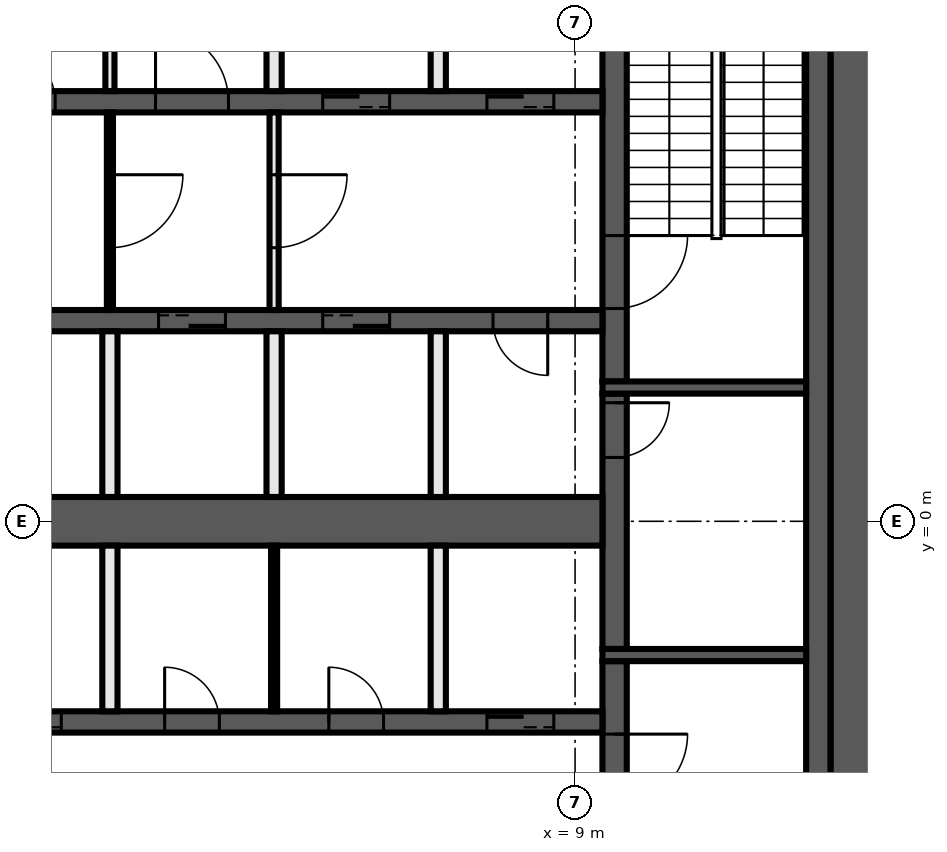
"""IFC4 building model, lengths in metres.
Left out: names, types, materials, properties, quantities, classifications, styles, units other than length and angle.
Written with IfcOpenShell. Run it as: python <this file> out.ifc"""

import sys

from ifc_helpers import new_model, si_unit, direction, frame, frame_2d, origin, place, context, subcontext, project, spatial, rectangle, extrude, element, fill, save


model = new_model("IFC4")
c1 = context("Model", 3, precision=1e-05, world=origin(), true_north=direction((0.0, 1.0)))
c2 = subcontext(c1, "Body", "Model", "MODEL_VIEW")
j1 = project(units=[si_unit("LENGTHUNIT", "METRE"), si_unit("PLANEANGLEUNIT", "RADIAN")], contexts=[c1])
p1 = place(None, origin())
s1 = spatial("IfcSite", under=j1, at=p1, CompositionType="ELEMENT")
p2 = place(p1, origin())
s2 = spatial("IfcBuilding", under=s1, at=p2, CompositionType="ELEMENT")
p3 = place(p2, frame((0.0, 0.0, 207.2)))
s3 = spatial("IfcBuildingStorey", under=s2, at=p3, CompositionType="ELEMENT", Elevation=207.2)
p4 = place(p3, frame((13.6, 10.2, 0.0), z_axis=(0.0, 0.0, 1.0), x_axis=(0.0, -1.0, 0.0)))
e1 = element("IfcWall", 1, at=p4, inside=s3, PredefinedType="SHEAR", context=c2, shape_type="SweptSolid", body=[
    extrude(rectangle(XDim=20.4, YDim=0.8, at=frame_2d((10.2, 0.0))), origin(), (0.0, 0.0, 1.0), 3.82),
])
p5 = place(p3, frame((13.0, 9.8, 0.0), z_axis=(0.0, 0.0, 1.0), x_axis=(0.0, -1.0, 0.0)))
e2 = element("IfcWall", 2, at=p5, inside=s3, PredefinedType="SHEAR", context=c2, shape_type="SweptSolid", body=[
    extrude(rectangle(XDim=19.6, YDim=0.4, at=frame_2d((9.8, 0.0))), origin(), (0.0, 0.0, 1.0), 3.82),
])
p6 = place(p3, frame((9.65, -2.3, 0.0), z_axis=(0.0, 0.0, 1.0), x_axis=(0.0, -1.0, 0.0)))
e3 = element("IfcWall", 3, at=p6, inside=s3, PredefinedType="SHEAR", context=c2, shape_type="SweptSolid", body=[
    extrude(rectangle(XDim=7.5, YDim=0.4, at=frame_2d((3.75, 0.0))), origin(), (0.0, 0.0, 1.0), 3.82),
])
p7 = place(p6, frame((1.2, 0.0, 0.0)))
e4 = element("IfcOpeningElement", 4, at=p7, cuts=e3, PredefinedType="OPENING", context=c2, shape_type="SweptSolid", body=[
    extrude(rectangle(XDim=1.2, YDim=2.1, at=frame_2d((0.6, 1.05))), frame((0.0, 0.21, 0.0), z_axis=(0.0, -1.0, 0.0), x_axis=(1.0, 0.0, 0.0)), (0.0, 0.0, 1.0), 0.42),
])
p8 = place(p3, frame((9.65, 2.1, 0.0), z_axis=(0.0, 0.0, 1.0), x_axis=(0.0, -1.0, 0.0)))
e5 = element("IfcWall", 5, at=p8, inside=s3, PredefinedType="SHEAR", context=c2, shape_type="SweptSolid", body=[
    extrude(rectangle(XDim=4.2, YDim=0.4, at=frame_2d((2.1, 0.0))), origin(), (0.0, 0.0, 1.0), 3.82),
])
p9 = place(p8, frame((0.15, 0.0, 0.0)))
e6 = element("IfcOpeningElement", 6, at=p9, cuts=e5, PredefinedType="OPENING", context=c2, shape_type="SweptSolid", body=[
    extrude(rectangle(XDim=0.9, YDim=2.1, at=frame_2d((0.45, 1.05))), frame((0.0, 0.21, 0.0), z_axis=(0.0, -1.0, 0.0), x_axis=(1.0, 0.0, 0.0)), (0.0, 0.0, 1.0), 0.42),
])
p10 = place(p3, frame((9.65, 9.8, 0.0), z_axis=(0.0, 0.0, 1.0), x_axis=(0.0, -1.0, 0.0)))
e7 = element("IfcWall", 7, at=p10, inside=s3, PredefinedType="SHEAR", context=c2, shape_type="SweptSolid", body=[
    extrude(rectangle(XDim=7.5, YDim=0.4, at=frame_2d((3.75, 0.0))), origin(), (0.0, 0.0, 1.0), 3.82),
])
p11 = place(p10, frame((5.1, 0.0, 0.0)))
e8 = element("IfcOpeningElement", 8, at=p11, cuts=e7, PredefinedType="OPENING", context=c2, shape_type="SweptSolid", body=[
    extrude(rectangle(XDim=1.2, YDim=2.1, at=frame_2d((0.6, 1.05))), frame((0.0, 0.21, 0.0), z_axis=(0.0, -1.0, 0.0), x_axis=(1.0, 0.0, 0.0)), (0.0, 0.0, 1.0), 0.42),
])
for number, where, z_axis, x_axis in (
    (9, (9.45, 2.2, 0.0), (0.0, 0.0, 1.0), (1.0, 0.0, 0.0)),
    (10, (9.45, -2.2, 0.0), (0.0, 0.0, 1.0), (1.0, 0.0, 0.0)),
):
    element("IfcWall", number, at=place(p3, frame(where, z_axis=z_axis, x_axis=x_axis)), inside=s3, PredefinedType="SHEAR", context=c2, shape_type="SweptSolid", body=[
        extrude(rectangle(XDim=3.35, YDim=0.2, at=frame_2d((1.675, 0.0))), origin(), (0.0, 0.0, 1.0), 3.82),
    ])
p12 = place(p3, frame((-9.45, 6.9, 0.0), z_axis=(0.0, 0.0, 1.0), x_axis=(1.0, 0.0, 0.0)))
e11 = element("IfcWall", 11, at=p12, inside=s3, PredefinedType="SHEAR", context=c2, shape_type="SweptSolid", body=[
    extrude(rectangle(XDim=18.9, YDim=0.35, at=frame_2d((9.45, 0.0))), origin(), (0.0, 0.0, 1.0), 3.82),
])
p13 = place(p12, frame((11.55, 0.0, 0.0)))
e12 = element("IfcOpeningElement", 12, at=p13, cuts=e11, PredefinedType="OPENING", context=c2, shape_type="SweptSolid", body=[
    extrude(rectangle(XDim=1.2, YDim=2.1, at=frame_2d((0.6, 1.05))), frame((0.0, 0.185, 0.0), z_axis=(0.0, -1.0, 0.0), x_axis=(1.0, 0.0, 0.0)), (0.0, 0.0, 1.0), 0.37),
])
p14 = place(p12, frame((14.3, 0.0, 0.0)))
e13 = element("IfcOpeningElement", 13, at=p14, cuts=e11, PredefinedType="OPENING", context=c2, shape_type="SweptSolid", body=[
    extrude(rectangle(XDim=1.1, YDim=2.1, at=frame_2d((0.55, 1.05))), frame((0.0, 0.185, 0.0), z_axis=(0.0, -1.0, 0.0), x_axis=(1.0, 0.0, 0.0)), (0.0, 0.0, 1.0), 0.37),
])
p15 = place(p12, frame((17.0, 0.0, 0.0)))
e14 = element("IfcOpeningElement", 14, at=p15, cuts=e11, PredefinedType="OPENING", context=c2, shape_type="SweptSolid", body=[
    extrude(rectangle(XDim=1.1, YDim=2.1, at=frame_2d((0.55, 1.05))), frame((0.0, 0.185, 0.0), z_axis=(0.0, -1.0, 0.0), x_axis=(1.0, 0.0, 0.0)), (0.0, 0.0, 1.0), 0.37),
])
p16 = place(p12, frame((0.9, 0.0, 0.0)))
e15 = element("IfcOpeningElement", 15, at=p16, cuts=e11, PredefinedType="OPENING", context=c2, shape_type="SweptSolid", body=[
    extrude(rectangle(XDim=0.9, YDim=2.1, at=frame_2d((0.45, 1.05))), frame((0.0, 0.185, 0.0), z_axis=(0.0, -1.0, 0.0), x_axis=(1.0, 0.0, 0.0)), (0.0, 0.0, 1.0), 0.37),
])
p17 = place(p12, frame((4.95, 0.0, 0.0)))
e16 = element("IfcOpeningElement", 16, at=p17, cuts=e11, PredefinedType="OPENING", context=c2, shape_type="SweptSolid", body=[
    extrude(rectangle(XDim=0.9, YDim=2.1, at=frame_2d((0.45, 1.05))), frame((0.0, 0.185, 0.0), z_axis=(0.0, -1.0, 0.0), x_axis=(1.0, 0.0, 0.0)), (0.0, 0.0, 1.0), 0.37),
])
p18 = place(p12, frame((9.0, 0.0, 0.0)))
e17 = element("IfcOpeningElement", 17, at=p18, cuts=e11, PredefinedType="OPENING", context=c2, shape_type="SweptSolid", body=[
    extrude(rectangle(XDim=0.9, YDim=2.1, at=frame_2d((0.45, 1.05))), frame((0.0, 0.185, 0.0), z_axis=(0.0, -1.0, 0.0), x_axis=(1.0, 0.0, 0.0)), (0.0, 0.0, 1.0), 0.37),
])
p19 = place(p3, frame((9.45, 3.3, 0.0), z_axis=(0.0, 0.0, 1.0), x_axis=(-1.0, 0.0, 0.0)))
e18 = element("IfcWall", 18, at=p19, inside=s3, PredefinedType="SHEAR", context=c2, shape_type="SweptSolid", body=[
    extrude(rectangle(XDim=18.9, YDim=0.35, at=frame_2d((9.45, 0.0))), origin(), (0.0, 0.0, 1.0), 3.82),
])
p20 = place(p19, frame((6.2, 0.0, 0.0)))
e19 = element("IfcOpeningElement", 19, at=p20, cuts=e18, PredefinedType="OPENING", context=c2, shape_type="SweptSolid", body=[
    extrude(rectangle(XDim=1.1, YDim=2.1, at=frame_2d((0.55, 1.05))), frame((0.0, 0.185, 0.0), z_axis=(0.0, -1.0, 0.0), x_axis=(1.0, 0.0, 0.0)), (0.0, 0.0, 1.0), 0.37),
])
p21 = place(p19, frame((3.5, 0.0, 0.0)))
e20 = element("IfcOpeningElement", 20, at=p21, cuts=e18, PredefinedType="OPENING", context=c2, shape_type="SweptSolid", body=[
    extrude(rectangle(XDim=1.1, YDim=2.1, at=frame_2d((0.55, 1.05))), frame((0.0, 0.185, 0.0), z_axis=(0.0, -1.0, 0.0), x_axis=(1.0, 0.0, 0.0)), (0.0, 0.0, 1.0), 0.37),
])
p22 = place(p19, frame((0.9, 0.0, 0.0)))
e21 = element("IfcOpeningElement", 21, at=p22, cuts=e18, PredefinedType="OPENING", context=c2, shape_type="SweptSolid", body=[
    extrude(rectangle(XDim=0.9, YDim=2.1, at=frame_2d((0.45, 1.05))), frame((0.0, 0.185, 0.0), z_axis=(0.0, -1.0, 0.0), x_axis=(1.0, 0.0, 0.0)), (0.0, 0.0, 1.0), 0.37),
])
p23 = place(p19, frame((15.75, 0.0, 0.0)))
e22 = element("IfcOpeningElement", 22, at=p23, cuts=e18, PredefinedType="OPENING", context=c2, shape_type="SweptSolid", body=[
    extrude(rectangle(XDim=0.9, YDim=2.1, at=frame_2d((0.45, 1.05))), frame((0.0, 0.185, 0.0), z_axis=(0.0, -1.0, 0.0), x_axis=(1.0, 0.0, 0.0)), (0.0, 0.0, 1.0), 0.37),
])
p24 = place(p19, frame((10.35, 0.0, 0.0)))
e23 = element("IfcOpeningElement", 23, at=p24, cuts=e18, PredefinedType="OPENING", context=c2, shape_type="SweptSolid", body=[
    extrude(rectangle(XDim=0.9, YDim=2.1, at=frame_2d((0.45, 1.05))), frame((0.0, 0.185, 0.0), z_axis=(0.0, -1.0, 0.0), x_axis=(1.0, 0.0, 0.0)), (0.0, 0.0, 1.0), 0.37),
])
p25 = place(p3, frame((-9.45, -3.3, 0.0), z_axis=(0.0, 0.0, 1.0), x_axis=(1.0, 0.0, 0.0)))
e24 = element("IfcWall", 24, at=p25, inside=s3, PredefinedType="SHEAR", context=c2, shape_type="SweptSolid", body=[
    extrude(rectangle(XDim=18.9, YDim=0.35, at=frame_2d((9.45, 0.0))), origin(), (0.0, 0.0, 1.0), 3.82),
])
p26 = place(p25, frame((0.8, 0.0, 0.0)))
e25 = element("IfcOpeningElement", 25, at=p26, cuts=e24, PredefinedType="OPENING", context=c2, shape_type="SweptSolid", body=[
    extrude(rectangle(XDim=1.1, YDim=2.1, at=frame_2d((0.55, 1.05))), frame((0.0, 0.185, 0.0), z_axis=(0.0, -1.0, 0.0), x_axis=(1.0, 0.0, 0.0)), (0.0, 0.0, 1.0), 0.37),
])
p27 = place(p25, frame((3.5, 0.0, 0.0)))
e26 = element("IfcOpeningElement", 26, at=p27, cuts=e24, PredefinedType="OPENING", context=c2, shape_type="SweptSolid", body=[
    extrude(rectangle(XDim=1.1, YDim=2.1, at=frame_2d((0.55, 1.05))), frame((0.0, 0.185, 0.0), z_axis=(0.0, -1.0, 0.0), x_axis=(1.0, 0.0, 0.0)), (0.0, 0.0, 1.0), 0.37),
])
p28 = place(p25, frame((6.2, 0.0, 0.0)))
e27 = element("IfcOpeningElement", 27, at=p28, cuts=e24, PredefinedType="OPENING", context=c2, shape_type="SweptSolid", body=[
    extrude(rectangle(XDim=1.1, YDim=2.1, at=frame_2d((0.55, 1.05))), frame((0.0, 0.185, 0.0), z_axis=(0.0, -1.0, 0.0), x_axis=(1.0, 0.0, 0.0)), (0.0, 0.0, 1.0), 0.37),
])
p29 = place(p25, frame((8.9, 0.0, 0.0)))
e28 = element("IfcOpeningElement", 28, at=p29, cuts=e24, PredefinedType="OPENING", context=c2, shape_type="SweptSolid", body=[
    extrude(rectangle(XDim=1.1, YDim=2.1, at=frame_2d((0.55, 1.05))), frame((0.0, 0.185, 0.0), z_axis=(0.0, -1.0, 0.0), x_axis=(1.0, 0.0, 0.0)), (0.0, 0.0, 1.0), 0.37),
])
p30 = place(p25, frame((17.0, 0.0, 0.0)))
e29 = element("IfcOpeningElement", 29, at=p30, cuts=e24, PredefinedType="OPENING", context=c2, shape_type="SweptSolid", body=[
    extrude(rectangle(XDim=1.1, YDim=2.1, at=frame_2d((0.55, 1.05))), frame((0.0, 0.185, 0.0), z_axis=(0.0, -1.0, 0.0), x_axis=(1.0, 0.0, 0.0)), (0.0, 0.0, 1.0), 0.37),
])
p31 = place(p25, frame((11.7, 0.0, 0.0)))
e30 = element("IfcOpeningElement", 30, at=p31, cuts=e24, PredefinedType="OPENING", context=c2, shape_type="SweptSolid", body=[
    extrude(rectangle(XDim=0.9, YDim=2.1, at=frame_2d((0.45, 1.05))), frame((0.0, 0.185, 0.0), z_axis=(0.0, -1.0, 0.0), x_axis=(1.0, 0.0, 0.0)), (0.0, 0.0, 1.0), 0.37),
])
p32 = place(p25, frame((14.4, 0.0, 0.0)))
e31 = element("IfcOpeningElement", 31, at=p32, cuts=e24, PredefinedType="OPENING", context=c2, shape_type="SweptSolid", body=[
    extrude(rectangle(XDim=0.9, YDim=2.1, at=frame_2d((0.45, 1.05))), frame((0.0, 0.185, 0.0), z_axis=(0.0, -1.0, 0.0), x_axis=(1.0, 0.0, 0.0)), (0.0, 0.0, 1.0), 0.37),
])
p33 = place(p3, frame((-9.45, 0.0, 0.0), z_axis=(0.0, 0.0, 1.0), x_axis=(1.0, 0.0, 0.0)))
e32 = element("IfcWall", 32, at=p33, inside=s3, PredefinedType="SHEAR", context=c2, shape_type="SweptSolid", body=[
    extrude(rectangle(XDim=18.9, YDim=0.8, at=frame_2d((9.45, 0.0))), origin(), (0.0, 0.0, 1.0), 3.82),
])
for number, where, z_axis, x_axis in (
    (33, (6.75, -3.125, 0.0), (0.0, 0.0, 1.0), (0.0, 1.0, 0.0)),
    (34, (6.75, 0.4, 0.0), (0.0, 0.0, 1.0), (0.0, 1.0, 0.0)),
    (35, (6.75, 7.075, 0.0), (0.0, 0.0, 1.0), (0.0, 1.0, 0.0)),
):
    element("IfcWall", number, at=place(p3, frame(where, z_axis=z_axis, x_axis=x_axis)), inside=s3, PredefinedType="SOLIDWALL", context=c2, shape_type="SweptSolid", body=[
        extrude(rectangle(XDim=2.725, YDim=0.25, at=frame_2d((1.363, 0.0))), origin(), (0.0, 0.0, 1.0), 3.82),
    ])
p34 = place(p3, frame((4.05, 6.725, 0.0), z_axis=(0.0, 0.0, 1.0), x_axis=(0.0, -1.0, 0.0)))
e36 = element("IfcWall", 36, at=p34, inside=s3, PredefinedType="PARTITIONING", context=c2, shape_type="SweptSolid", body=[
    extrude(rectangle(XDim=3.25, YDim=0.15, at=frame_2d((1.625, 0.0))), origin(), (0.0, 0.0, 1.0), 3.82),
])
p35 = place(p34, frame((1.025, 0.0, 0.0)))
e37 = element("IfcOpeningElement", 37, at=p35, cuts=e36, PredefinedType="OPENING", context=c2, shape_type="SweptSolid", body=[
    extrude(rectangle(XDim=1.2, YDim=2.1, at=frame_2d((0.6, 1.05))), frame((0.0, 0.085, 0.0), z_axis=(0.0, -1.0, 0.0), x_axis=(1.0, 0.0, 0.0)), (0.0, 0.0, 1.0), 0.17),
])
p36 = place(p3, frame((4.05, -3.125, 0.0), z_axis=(0.0, 0.0, 1.0), x_axis=(0.0, 1.0, 0.0)))
e38 = element("IfcWall", 38, at=p36, inside=s3, PredefinedType="PARTITIONING", context=c2, shape_type="SweptSolid", body=[
    extrude(rectangle(XDim=2.725, YDim=0.1, at=frame_2d((1.363, 0.0))), origin(), (0.0, 0.0, 1.0), 3.82),
])
for number, where, z_axis, x_axis in (
    (39, (4.05, 0.4, 0.0), (0.0, 0.0, 1.0), (0.0, 1.0, 0.0)),
    (40, (4.05, 7.075, 0.0), (0.0, 0.0, 1.0), (0.0, 1.0, 0.0)),
):
    element("IfcWall", number, at=place(p3, frame(where, z_axis=z_axis, x_axis=x_axis)), inside=s3, PredefinedType="SOLIDWALL", context=c2, shape_type="SweptSolid", body=[
        extrude(rectangle(XDim=2.725, YDim=0.25, at=frame_2d((1.363, 0.0))), origin(), (0.0, 0.0, 1.0), 3.82),
    ])
p37 = place(p3, frame((1.35, 7.075, 0.0), z_axis=(0.0, 0.0, 1.0), x_axis=(0.0, 1.0, 0.0)))
e41 = element("IfcWall", 41, at=p37, inside=s3, PredefinedType="PARTITIONING", context=c2, shape_type="SweptSolid", body=[
    extrude(rectangle(XDim=2.725, YDim=0.15, at=frame_2d((1.363, 0.0))), origin(), (0.0, 0.0, 1.0), 3.82),
])
p38 = place(p3, frame((1.35, 6.725, 0.0), z_axis=(0.0, 0.0, 1.0), x_axis=(0.0, -1.0, 0.0)))
e42 = element("IfcWall", 42, at=p38, inside=s3, PredefinedType="PARTITIONING", context=c2, shape_type="SweptSolid", body=[
    extrude(rectangle(XDim=3.25, YDim=0.1, at=frame_2d((1.625, 0.0))), origin(), (0.0, 0.0, 1.0), 3.82),
])
p39 = place(p38, frame((1.025, 0.0, 0.0)))
e43 = element("IfcOpeningElement", 43, at=p39, cuts=e42, PredefinedType="OPENING", context=c2, shape_type="SweptSolid", body=[
    extrude(rectangle(XDim=1.2, YDim=2.1, at=frame_2d((0.6, 1.05))), frame((0.0, 0.06, 0.0), z_axis=(0.0, -1.0, 0.0), x_axis=(1.0, 0.0, 0.0)), (0.0, 0.0, 1.0), 0.12),
])
for number, where, z_axis, x_axis in (
    (44, (1.35, -3.125, 0.0), (0.0, 0.0, 1.0), (0.0, 1.0, 0.0)),
    (45, (1.35, 0.4, 0.0), (0.0, 0.0, 1.0), (0.0, 1.0, 0.0)),
):
    element("IfcWall", number, at=place(p3, frame(where, z_axis=z_axis, x_axis=x_axis)), inside=s3, PredefinedType="SOLIDWALL", context=c2, shape_type="SweptSolid", body=[
        extrude(rectangle(XDim=2.725, YDim=0.25, at=frame_2d((1.363, 0.0))), origin(), (0.0, 0.0, 1.0), 3.82),
    ])
p40 = place(p9, origin())
e46 = element("IfcDoor", 46, at=p40, inside=s3, OperationType="SINGLE_SWING_RIGHT", PredefinedType="DOOR", context=c2, shape_type="SweptSolid", body=[
    extrude(rectangle(XDim=0.9, YDim=2.1, at=frame_2d((0.45, 1.05))), frame((0.0, 0.025, 0.0), z_axis=(0.0, -1.0, 0.0), x_axis=(1.0, 0.0, 0.0)), (0.0, 0.0, 1.0), 0.05),
])
fill(e6, e46)
p41 = place(p13, origin())
e47 = element("IfcDoor", 47, at=p41, inside=s3, OperationType="SINGLE_SWING_LEFT", PredefinedType="DOOR", context=c2, shape_type="SweptSolid", body=[
    extrude(rectangle(XDim=1.2, YDim=2.1, at=frame_2d((0.6, 1.05))), frame((0.0, 0.025, 0.0), z_axis=(0.0, -1.0, 0.0), x_axis=(1.0, 0.0, 0.0)), (0.0, 0.0, 1.0), 0.05),
])
fill(e12, e47)
p42 = place(p14, origin())
e48 = element("IfcDoor", 48, at=p42, inside=s3, OperationType="DOUBLE_DOOR_SLIDING", PredefinedType="DOOR", context=c2, shape_type="SweptSolid", body=[
    extrude(rectangle(XDim=1.1, YDim=2.1, at=frame_2d((0.55, 1.05))), frame((0.0, 0.025, 0.0), z_axis=(0.0, -1.0, 0.0), x_axis=(1.0, 0.0, 0.0)), (0.0, 0.0, 1.0), 0.05),
])
fill(e13, e48)
p43 = place(p15, origin())
e49 = element("IfcDoor", 49, at=p43, inside=s3, OperationType="DOUBLE_DOOR_SLIDING", PredefinedType="DOOR", context=c2, shape_type="SweptSolid", body=[
    extrude(rectangle(XDim=1.1, YDim=2.1, at=frame_2d((0.55, 1.05))), frame((0.0, 0.025, 0.0), z_axis=(0.0, -1.0, 0.0), x_axis=(1.0, 0.0, 0.0)), (0.0, 0.0, 1.0), 0.05),
])
fill(e14, e49)
p44 = place(p20, origin())
e50 = element("IfcDoor", 50, at=p44, inside=s3, OperationType="DOUBLE_DOOR_SLIDING", PredefinedType="DOOR", context=c2, shape_type="SweptSolid", body=[
    extrude(rectangle(XDim=1.1, YDim=2.1, at=frame_2d((0.55, 1.05))), frame((0.0, 0.025, 0.0), z_axis=(0.0, -1.0, 0.0), x_axis=(1.0, 0.0, 0.0)), (0.0, 0.0, 1.0), 0.05),
])
fill(e19, e50)
p45 = place(p21, origin())
e51 = element("IfcDoor", 51, at=p45, inside=s3, OperationType="DOUBLE_DOOR_SLIDING", PredefinedType="DOOR", context=c2, shape_type="SweptSolid", body=[
    extrude(rectangle(XDim=1.1, YDim=2.1, at=frame_2d((0.55, 1.05))), frame((0.0, 0.025, 0.0), z_axis=(0.0, -1.0, 0.0), x_axis=(1.0, 0.0, 0.0)), (0.0, 0.0, 1.0), 0.05),
])
fill(e20, e51)
p46 = place(p22, origin())
e52 = element("IfcDoor", 52, at=p46, inside=s3, OperationType="SINGLE_SWING_LEFT", PredefinedType="DOOR", context=c2, shape_type="SweptSolid", body=[
    extrude(rectangle(XDim=0.9, YDim=2.1, at=frame_2d((0.45, 1.05))), frame((0.0, 0.025, 0.0), z_axis=(0.0, -1.0, 0.0), x_axis=(1.0, 0.0, 0.0)), (0.0, 0.0, 1.0), 0.05),
])
fill(e21, e52)
p47 = place(p29, origin())
e53 = element("IfcDoor", 53, at=p47, inside=s3, OperationType="DOUBLE_DOOR_SLIDING", PredefinedType="DOOR", context=c2, shape_type="SweptSolid", body=[
    extrude(rectangle(XDim=1.1, YDim=2.1, at=frame_2d((0.55, 1.05))), frame((0.0, 0.025, 0.0), z_axis=(0.0, -1.0, 0.0), x_axis=(1.0, 0.0, 0.0)), (0.0, 0.0, 1.0), 0.05),
])
fill(e28, e53)
p48 = place(p30, origin())
e54 = element("IfcDoor", 54, at=p48, inside=s3, OperationType="DOUBLE_DOOR_SLIDING", PredefinedType="DOOR", context=c2, shape_type="SweptSolid", body=[
    extrude(rectangle(XDim=1.1, YDim=2.1, at=frame_2d((0.55, 1.05))), frame((0.0, 0.025, 0.0), z_axis=(0.0, -1.0, 0.0), x_axis=(1.0, 0.0, 0.0)), (0.0, 0.0, 1.0), 0.05),
])
fill(e29, e54)
p49 = place(p18, origin())
e55 = element("IfcDoor", 55, at=p49, inside=s3, OperationType="SINGLE_SWING_RIGHT", PredefinedType="DOOR", context=c2, shape_type="SweptSolid", body=[
    extrude(rectangle(XDim=0.9, YDim=2.1, at=frame_2d((0.45, 1.05))), frame((0.0, 0.025, 0.0), z_axis=(0.0, -1.0, 0.0), x_axis=(1.0, 0.0, 0.0)), (0.0, 0.0, 1.0), 0.05),
])
fill(e17, e55)
p50 = place(p31, origin())
e56 = element("IfcDoor", 56, at=p50, inside=s3, OperationType="SINGLE_SWING_LEFT", PredefinedType="DOOR", context=c2, shape_type="SweptSolid", body=[
    extrude(rectangle(XDim=0.9, YDim=2.1, at=frame_2d((0.45, 1.05))), frame((0.0, 0.025, 0.0), z_axis=(0.0, -1.0, 0.0), x_axis=(1.0, 0.0, 0.0)), (0.0, 0.0, 1.0), 0.05),
])
fill(e30, e56)
p51 = place(p32, origin())
e57 = element("IfcDoor", 57, at=p51, inside=s3, OperationType="SINGLE_SWING_RIGHT", PredefinedType="DOOR", context=c2, shape_type="SweptSolid", body=[
    extrude(rectangle(XDim=0.9, YDim=2.1, at=frame_2d((0.45, 1.05))), frame((0.0, 0.025, 0.0), z_axis=(0.0, -1.0, 0.0), x_axis=(1.0, 0.0, 0.0)), (0.0, 0.0, 1.0), 0.05),
])
fill(e31, e57)
p52 = place(p11, origin())
e58 = element("IfcDoor", 58, at=p52, inside=s3, OperationType="SINGLE_SWING_LEFT", PredefinedType="DOOR", context=c2, shape_type="SweptSolid", body=[
    extrude(rectangle(XDim=1.2, YDim=2.1, at=frame_2d((0.6, 1.05))), frame((0.0, 0.025, 0.0), z_axis=(0.0, -1.0, 0.0), x_axis=(1.0, 0.0, 0.0)), (0.0, 0.0, 1.0), 0.05),
])
fill(e8, e58)
p53 = place(p7, origin())
e59 = element("IfcDoor", 59, at=p53, inside=s3, OperationType="SINGLE_SWING_RIGHT", PredefinedType="DOOR", context=c2, shape_type="SweptSolid", body=[
    extrude(rectangle(XDim=1.2, YDim=2.1, at=frame_2d((0.6, 1.05))), frame((0.0, 0.025, 0.0), z_axis=(0.0, -1.0, 0.0), x_axis=(1.0, 0.0, 0.0)), (0.0, 0.0, 1.0), 0.05),
])
fill(e4, e59)
p54 = place(p39, origin())
e60 = element("IfcDoor", 60, at=p54, inside=s3, OperationType="SINGLE_SWING_LEFT", PredefinedType="DOOR", context=c2, shape_type="SweptSolid", body=[
    extrude(rectangle(XDim=1.2, YDim=2.1, at=frame_2d((0.6, 1.05))), frame((0.0, 0.025, 0.0), z_axis=(0.0, -1.0, 0.0), x_axis=(1.0, 0.0, 0.0)), (0.0, 0.0, 1.0), 0.05),
])
fill(e43, e60)
p55 = place(p35, origin())
e61 = element("IfcDoor", 61, at=p55, inside=s3, OperationType="SINGLE_SWING_RIGHT", PredefinedType="DOOR", context=c2, shape_type="SweptSolid", body=[
    extrude(rectangle(XDim=1.2, YDim=2.1, at=frame_2d((0.6, 1.05))), frame((0.0, 0.025, 0.0), z_axis=(0.0, -1.0, 0.0), x_axis=(1.0, 0.0, 0.0)), (0.0, 0.0, 1.0), 0.05),
])
fill(e37, e61)
save(model, sys.argv[1])
